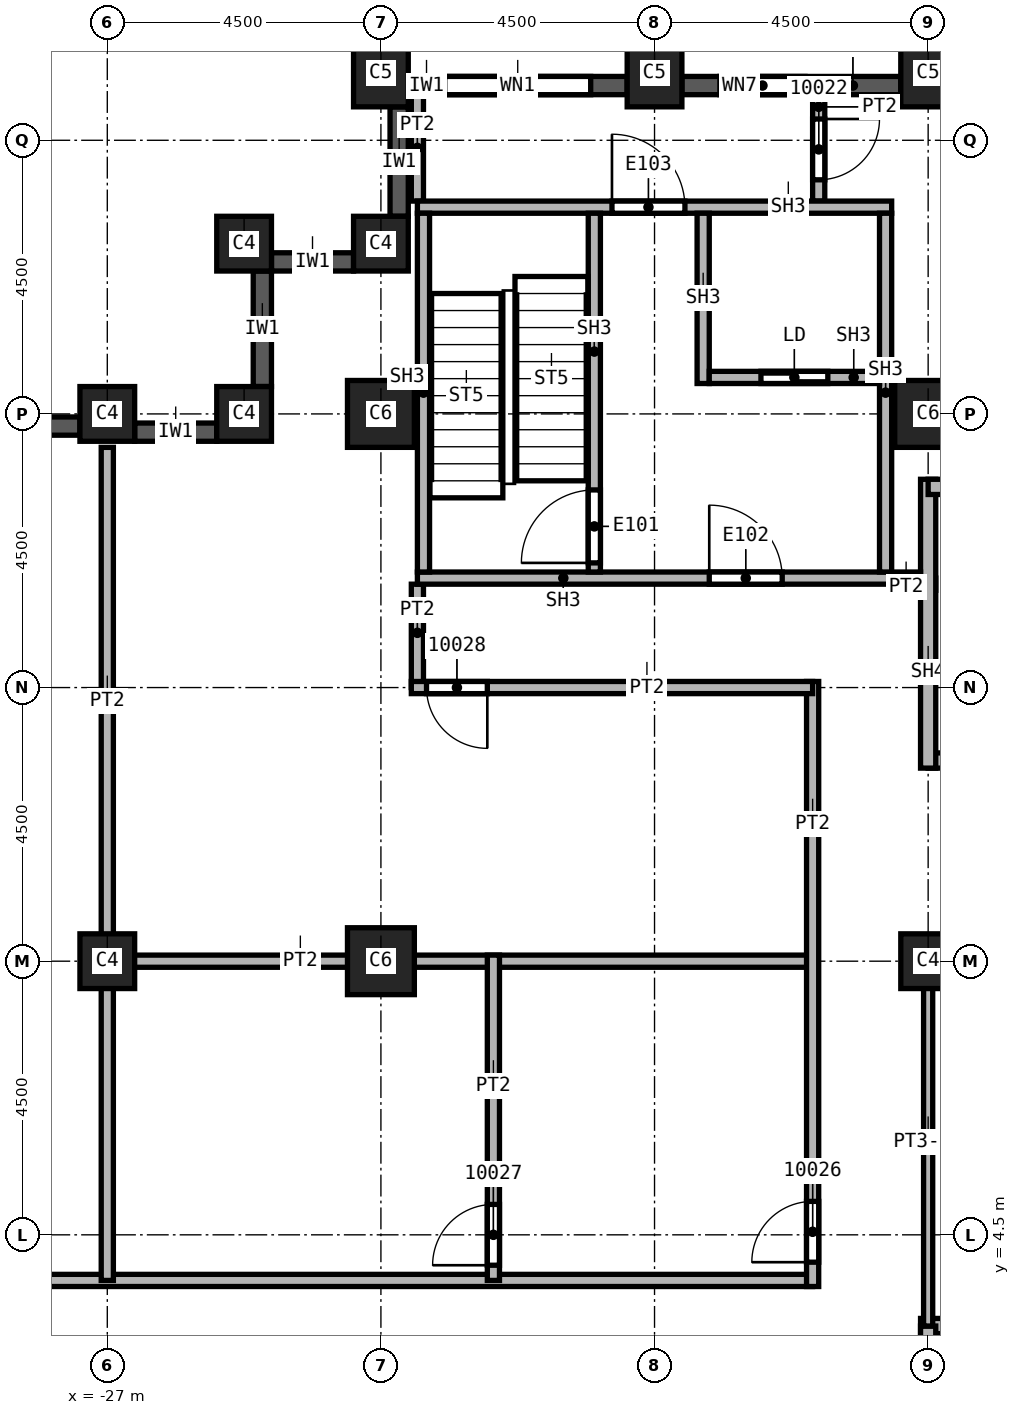
"""IFC4 building model, lengths in metres.
Left out: names, types, materials, properties, quantities, classifications, styles, units other than length and angle.
Written with IfcOpenShell. Run it as: python <this file> out.ifc"""

import sys

from ifc_helpers import new_model, si_unit, direction, frame, frame_2d, origin, origin_2d, place, context, subcontext, project, spatial, rectangle, extrude, element, fill, save


model = new_model("IFC4")
c1 = context("Model", 3, precision=1e-05, world=origin(), true_north=direction((0.0, 1.0)))
c2 = subcontext(c1, "Body", "Model", "MODEL_VIEW")
j1 = project(units=[si_unit("LENGTHUNIT", "METRE"), si_unit("PLANEANGLEUNIT", "RADIAN")], contexts=[c1])
p1 = place(None, origin())
s1 = spatial("IfcSite", under=j1, at=p1, CompositionType="ELEMENT")
p2 = place(p1, origin())
s2 = spatial("IfcBuilding", under=s1, at=p2, CompositionType="ELEMENT")
p3 = place(p2, frame((0.0, 0.0, 170.0)))
s3 = spatial("IfcBuildingStorey", under=s2, at=p3, CompositionType="ELEMENT", Elevation=170.0)
for number, where, z_axis, x_axis in (
    (1, (-13.5, 18.0, 0.0), (0.0, 0.0, 1.0), (1.0, 0.0, 0.0)),
    (2, (-22.5, 9.0, 0.0), (0.0, 0.0, 1.0), (1.0, 0.0, 0.0)),
    (3, (-22.5, 18.0, 0.0), (0.0, 0.0, 1.0), (1.0, 0.0, 0.0)),
):
    element("IfcColumn", number, at=place(p3, frame(where, z_axis=z_axis, x_axis=x_axis)), inside=s3, PredefinedType="COLUMN", context=c2, shape_type="SweptSolid", body=[
        extrude(rectangle(XDim=1.1, YDim=1.1, at=origin_2d()), origin(), (0.0, 0.0, 1.0), 3.7),
    ])
p4 = place(p3, frame((-13.5, 9.0, 0.0), z_axis=(0.0, 0.0, 1.0), x_axis=(1.0, 0.0, 0.0)))
e4 = element("IfcColumn", 4, at=p4, inside=s3, PredefinedType="COLUMN", context=c2, shape_type="SweptSolid", body=[
    extrude(rectangle(XDim=0.9, YDim=0.9, at=origin_2d()), origin(), (0.0, 0.0, 1.0), 3.7),
])
for number, where, z_axis, x_axis in (
    (5, (-13.5, 23.6, 0.0), (0.0, 0.0, 1.0), (1.0, 0.0, 0.0)),
    (6, (-18.0, 23.6, 0.0), (0.0, 0.0, 1.0), (1.0, 0.0, 0.0)),
    (7, (-22.5, 23.6, 0.0), (0.0, 0.0, 1.0), (1.0, 0.0, 0.0)),
):
    element("IfcColumn", number, at=place(p3, frame(where, z_axis=z_axis, x_axis=x_axis)), inside=s3, PredefinedType="COLUMN", context=c2, shape_type="SweptSolid", body=[
        extrude(rectangle(XDim=0.9, YDim=1.1, at=origin_2d()), origin(), (0.0, 0.0, 1.0), 3.7),
    ])
for number, where, z_axis, x_axis in (
    (8, (-27.0, 9.0, 0.0), (0.0, 0.0, 1.0), (1.0, 0.0, 0.0)),
    (9, (-27.0, 18.0, 0.0), (0.0, 0.0, 1.0), (1.0, 0.0, 0.0)),
    (10, (-22.5, 20.8, 0.0), (0.0, 0.0, 1.0), (1.0, 0.0, 0.0)),
    (11, (-24.75, 20.8, 0.0), (0.0, 0.0, 1.0), (1.0, 0.0, 0.0)),
    (12, (-24.75, 18.0, 0.0), (0.0, 0.0, 1.0), (1.0, 0.0, 0.0)),
):
    element("IfcColumn", number, at=place(p3, frame(where, z_axis=z_axis, x_axis=x_axis)), inside=s3, PredefinedType="COLUMN", context=c2, shape_type="SweptSolid", body=[
        extrude(rectangle(XDim=0.9, YDim=0.9, at=origin_2d()), origin(), (0.0, 0.0, 1.0), 3.7),
    ])
p5 = place(p3, frame((-22.2, 23.05, 0.0), z_axis=(0.0, 0.0, 1.0), x_axis=(0.0, -1.0, 0.0)))
e13 = element("IfcWall", 13, at=p5, inside=s3, PredefinedType="SOLIDWALL", context=c2, shape_type="SweptSolid", body=[
    extrude(rectangle(XDim=1.8, YDim=0.3, at=frame_2d((0.9, 0.0))), origin(), (0.0, 0.0, 1.0), 3.1),
])
p6 = place(p3, frame((-22.95, 20.5, 0.0), z_axis=(0.0, 0.0, 1.0), x_axis=(-1.0, 0.0, 0.0)))
e14 = element("IfcWall", 14, at=p6, inside=s3, PredefinedType="SOLIDWALL", context=c2, shape_type="SweptSolid", body=[
    extrude(rectangle(XDim=1.35, YDim=0.3, at=frame_2d((0.675, 0.0))), origin(), (0.0, 0.0, 1.0), 3.1),
])
p7 = place(p3, frame((-24.45, 20.35, 0.0), z_axis=(0.0, 0.0, 1.0), x_axis=(0.0, -1.0, 0.0)))
e15 = element("IfcWall", 15, at=p7, inside=s3, PredefinedType="SOLIDWALL", context=c2, shape_type="SweptSolid", body=[
    extrude(rectangle(XDim=1.9, YDim=0.3, at=frame_2d((0.95, 0.0))), origin(), (0.0, 0.0, 1.0), 3.1),
])
p8 = place(p3, frame((-25.2, 17.7, 0.0), z_axis=(0.0, 0.0, 1.0), x_axis=(-1.0, 0.0, 0.0)))
e16 = element("IfcWall", 16, at=p8, inside=s3, PredefinedType="SOLIDWALL", context=c2, shape_type="SweptSolid", body=[
    extrude(rectangle(XDim=1.35, YDim=0.3, at=frame_2d((0.675, 0.0))), origin(), (0.0, 0.0, 1.0), 3.1),
])
p9 = place(p3, frame((-27.45, 17.8, 0.0), z_axis=(0.0, 0.0, 1.0), x_axis=(-1.0, 0.0, 0.0)))
e17 = element("IfcWall", 17, at=p9, inside=s3, PredefinedType="SOLIDWALL", context=c2, shape_type="SweptSolid", body=[
    extrude(rectangle(XDim=3.6, YDim=0.3, at=frame_2d((1.8, 0.0))), origin(), (0.0, 0.0, 1.0), 3.1),
])
p10 = place(p9, frame((0.6, 0.0, 0.8)))
e18 = element("IfcOpeningElement", 18, at=p10, cuts=e17, PredefinedType="OPENING", context=c2, shape_type="SweptSolid", body=[
    extrude(rectangle(XDim=2.4, YDim=1.95, at=frame_2d((1.2, 0.975))), frame((0.0, 0.15, 0.0), z_axis=(0.0, -1.0, 0.0), x_axis=(1.0, 0.0, 0.0)), (0.0, 0.0, 1.0), 0.3),
])
p11 = place(p3, frame((-13.95, 23.4, 0.0), z_axis=(0.0, 0.0, 1.0), x_axis=(-1.0, 0.0, 0.0)))
e19 = element("IfcWall", 19, at=p11, inside=s3, PredefinedType="SOLIDWALL", context=c2, shape_type="SweptSolid", body=[
    extrude(rectangle(XDim=3.6, YDim=0.3, at=frame_2d((1.8, 0.0))), origin(), (0.0, 0.0, 1.0), 3.1),
])
p12 = place(p11, frame((1.575, 0.0, 0.8)))
e20 = element("IfcOpeningElement", 20, at=p12, cuts=e19, PredefinedType="OPENING", context=c2, shape_type="SweptSolid", body=[
    extrude(rectangle(XDim=1.4, YDim=1.95, at=frame_2d((0.7, 0.975))), frame((0.0, 0.15, 0.0), z_axis=(0.0, -1.0, 0.0), x_axis=(1.0, 0.0, 0.0)), (0.0, 0.0, 1.0), 0.3),
])
p13 = place(p3, frame((-18.45, 23.4, 0.0), z_axis=(0.0, 0.0, 1.0), x_axis=(-1.0, 0.0, 0.0)))
e21 = element("IfcWall", 21, at=p13, inside=s3, PredefinedType="SOLIDWALL", context=c2, shape_type="SweptSolid", body=[
    extrude(rectangle(XDim=3.6, YDim=0.3, at=frame_2d((1.8, 0.0))), origin(), (0.0, 0.0, 1.0), 3.1),
])
p14 = place(p13, frame((0.6, 0.0, 0.8)))
e22 = element("IfcOpeningElement", 22, at=p14, cuts=e21, PredefinedType="OPENING", context=c2, shape_type="SweptSolid", body=[
    extrude(rectangle(XDim=2.4, YDim=1.95, at=frame_2d((1.2, 0.975))), frame((0.0, 0.15, 0.0), z_axis=(0.0, -1.0, 0.0), x_axis=(1.0, 0.0, 0.0)), (0.0, 0.0, 1.0), 0.3),
])
p15 = place(p3, frame((-33.85, 3.75, 0.0), z_axis=(0.0, 0.0, 1.0), x_axis=(1.0, 0.0, 0.0)))
e23 = element("IfcWall", 23, at=p15, inside=s3, PredefinedType="PARTITIONING", context=c2, shape_type="SweptSolid", body=[
    extrude(rectangle(XDim=18.45, YDim=0.2, at=frame_2d((9.225, 0.0))), origin(), (0.0, 0.0, 1.0), 3.7),
])
p16 = place(p3, frame((-27.1, 9.0, 0.0), z_axis=(0.0, 0.0, 1.0), x_axis=(1.0, 0.0, 0.0)))
e24 = element("IfcWall", 24, at=p16, inside=s3, PredefinedType="PARTITIONING", context=c2, shape_type="SweptSolid", body=[
    extrude(rectangle(XDim=11.7, YDim=0.2, at=frame_2d((5.85, 0.0))), origin(), (0.0, 0.0, 1.0), 3.7),
])
p17 = place(p3, frame((-27.0, 3.75, 0.0), z_axis=(0.0, 0.0, 1.0), x_axis=(0.0, 1.0, 0.0)))
e25 = element("IfcWall", 25, at=p17, inside=s3, PredefinedType="PARTITIONING", context=c2, shape_type="SweptSolid", body=[
    extrude(rectangle(XDim=13.7, YDim=0.2, at=frame_2d((6.85, 0.0))), origin(), (0.0, 0.0, 1.0), 3.7),
])
p18 = place(p3, frame((-21.9, 13.5, 0.0), z_axis=(0.0, 0.0, 1.0), x_axis=(0.0, 1.0, 0.0)))
e26 = element("IfcWall", 26, at=p18, inside=s3, PredefinedType="PARTITIONING", context=c2, shape_type="SweptSolid", body=[
    extrude(rectangle(XDim=1.7, YDim=0.2, at=frame_2d((0.85, 0.0))), origin(), (0.0, 0.0, 1.0), 3.7),
])
p19 = place(p3, frame((-21.9, 21.5, 0.0), z_axis=(0.0, 0.0, 1.0), x_axis=(0.0, 1.0, 0.0)))
e27 = element("IfcWall", 27, at=p19, inside=s3, PredefinedType="PARTITIONING", context=c2, shape_type="SweptSolid", body=[
    extrude(rectangle(XDim=1.75, YDim=0.2, at=frame_2d((0.875, 0.0))), origin(), (0.0, 0.0, 1.0), 3.7),
])
p20 = place(p3, frame((-20.65, 3.75, 0.0), z_axis=(0.0, 0.0, 1.0), x_axis=(0.0, 1.0, 0.0)))
e28 = element("IfcWall", 28, at=p20, inside=s3, PredefinedType="PARTITIONING", context=c2, shape_type="SweptSolid", body=[
    extrude(rectangle(XDim=5.35, YDim=0.2, at=frame_2d((2.675, 0.0))), origin(), (0.0, 0.0, 1.0), 3.7),
])
p21 = place(p20, frame((0.25, 0.0, 0.0)))
e29 = element("IfcOpeningElement", 29, at=p21, cuts=e28, PredefinedType="OPENING", context=c2, shape_type="SweptSolid", body=[
    extrude(rectangle(XDim=1.0, YDim=2.1, at=frame_2d((0.5, 1.05))), frame((0.0, 0.1, 0.0), z_axis=(0.0, -1.0, 0.0), x_axis=(1.0, 0.0, 0.0)), (0.0, 0.0, 1.0), 0.2),
])
p22 = place(p3, frame((-15.4, 3.65, 0.0), z_axis=(0.0, 0.0, 1.0), x_axis=(0.0, 1.0, 0.0)))
e30 = element("IfcWall", 30, at=p22, inside=s3, PredefinedType="PARTITIONING", context=c2, shape_type="SweptSolid", body=[
    extrude(rectangle(XDim=9.95, YDim=0.2, at=frame_2d((4.975, 0.0))), origin(), (0.0, 0.0, 1.0), 3.7),
])
p23 = place(p22, frame((0.4, 0.0, 0.0)))
e31 = element("IfcOpeningElement", 31, at=p23, cuts=e30, PredefinedType="OPENING", context=c2, shape_type="SweptSolid", body=[
    extrude(rectangle(XDim=1.0, YDim=2.1, at=frame_2d((0.5, 1.05))), frame((0.0, 0.1, 0.0), z_axis=(0.0, -1.0, 0.0), x_axis=(1.0, 0.0, 0.0)), (0.0, 0.0, 1.0), 0.2),
])
p24 = place(p3, frame((-15.4, 13.5, 0.0), z_axis=(0.0, 0.0, 1.0), x_axis=(-1.0, 0.0, 0.0)))
e32 = element("IfcWall", 32, at=p24, inside=s3, PredefinedType="PARTITIONING", context=c2, shape_type="SweptSolid", body=[
    extrude(rectangle(XDim=6.6, YDim=0.2, at=frame_2d((3.3, 0.0))), origin(), (0.0, 0.0, 1.0), 3.7),
])
p25 = place(p24, frame((5.35, 0.0, 0.0)))
e33 = element("IfcOpeningElement", 33, at=p25, cuts=e32, PredefinedType="OPENING", context=c2, shape_type="SweptSolid", body=[
    extrude(rectangle(XDim=1.0, YDim=2.1, at=frame_2d((0.5, 1.05))), frame((0.0, 0.1, 0.0), z_axis=(0.0, -1.0, 0.0), x_axis=(1.0, 0.0, 0.0)), (0.0, 0.0, 1.0), 0.2),
])
p26 = place(p3, frame((-15.3, 23.25, 0.0), z_axis=(0.0, 0.0, 1.0), x_axis=(0.0, -1.0, 0.0)))
e34 = element("IfcWall", 34, at=p26, inside=s3, PredefinedType="PARTITIONING", context=c2, shape_type="SweptSolid", body=[
    extrude(rectangle(XDim=1.75, YDim=0.2, at=frame_2d((0.875, 0.0))), origin(), (0.0, 0.0, 1.0), 3.7),
])
p27 = place(p26, frame((0.4, 0.0, 0.0)))
e35 = element("IfcOpeningElement", 35, at=p27, cuts=e34, PredefinedType="OPENING", context=c2, shape_type="SweptSolid", body=[
    extrude(rectangle(XDim=1.0, YDim=2.1, at=frame_2d((0.5, 1.05))), frame((0.0, 0.1, 0.0), z_axis=(0.0, -1.0, 0.0), x_axis=(1.0, 0.0, 0.0)), (0.0, 0.0, 1.0), 0.2),
])
p28 = place(p3, frame((-14.1, 15.2, 0.0), z_axis=(0.0, 0.0, 1.0), x_axis=(1.0, 0.0, 0.0)))
e36 = element("IfcWall", 36, at=p28, inside=s3, PredefinedType="PARTITIONING", context=c2, shape_type="SweptSolid", body=[
    extrude(rectangle(XDim=0.725, YDim=0.2, at=frame_2d((0.363, 0.0))), origin(), (0.0, 0.0, 1.0), 3.7),
])
p29 = place(p3, frame((-13.625, 3.0, 0.0), z_axis=(0.0, 0.0, 1.0), x_axis=(1.0, 0.0, 0.0)))
e37 = element("IfcWall", 37, at=p29, inside=s3, PredefinedType="SOLIDWALL", context=c2, shape_type="SweptSolid", body=[
    extrude(rectangle(XDim=6.125, YDim=0.25, at=frame_2d((3.062, 0.0))), origin(), (0.0, 0.0, 1.0), 3.7),
])
p30 = place(p29, frame((3.25, 0.0, 0.0)))
e38 = element("IfcOpeningElement", 38, at=p30, cuts=e37, PredefinedType="OPENING", context=c2, shape_type="SweptSolid", body=[
    extrude(rectangle(XDim=1.1, YDim=2.1, at=frame_2d((0.55, 1.05))), frame((0.0, 0.125, 0.0), z_axis=(0.0, -1.0, 0.0), x_axis=(1.0, 0.0, 0.0)), (0.0, 0.0, 1.0), 0.25),
])
p31 = place(p3, frame((-13.5, -3.0, 0.0), z_axis=(0.0, 0.0, 1.0), x_axis=(0.0, 1.0, 0.0)))
e39 = element("IfcWall", 39, at=p31, inside=s3, PredefinedType="SOLIDWALL", context=c2, shape_type="SweptSolid", body=[
    extrude(rectangle(XDim=6.0, YDim=0.25, at=frame_2d((3.0, 0.0))), origin(), (0.0, 0.0, 1.0), 2.938),
])
p32 = place(p3, frame((-13.5, 12.3, 0.0), z_axis=(0.0, 0.0, 1.0), x_axis=(1.0, 0.0, 0.0)))
e40 = element("IfcWall", 40, at=p32, inside=s3, PredefinedType="SOLIDWALL", context=c2, shape_type="SweptSolid", body=[
    extrude(rectangle(XDim=9.125, YDim=0.25, at=frame_2d((4.562, 0.0))), origin(), (0.0, 0.0, 1.0), 3.7),
])
p33 = place(p32, frame((0.6, 0.0, 0.0)))
e41 = element("IfcOpeningElement", 41, at=p33, cuts=e40, PredefinedType="OPENING", context=c2, shape_type="SweptSolid", body=[
    extrude(rectangle(XDim=1.2, YDim=2.1, at=frame_2d((0.6, 1.05))), frame((0.0, 0.125, 0.0), z_axis=(0.0, -1.0, 0.0), x_axis=(1.0, 0.0, 0.0)), (0.0, 0.0, 1.0), 0.25),
])
p34 = place(p3, frame((-13.5, 12.175, 0.0), z_axis=(0.0, 0.0, 1.0), x_axis=(0.0, 1.0, 0.0)))
e42 = element("IfcWall", 42, at=p34, inside=s3, PredefinedType="SOLIDWALL", context=c2, shape_type="SweptSolid", body=[
    extrude(rectangle(XDim=4.75, YDim=0.25, at=frame_2d((2.375, 0.0))), origin(), (0.0, 0.0, 1.0), 3.7),
])
p35 = place(p3, frame((-13.5, 16.8, 0.0), z_axis=(0.0, 0.0, 1.0), x_axis=(1.0, 0.0, 0.0)))
e43 = element("IfcWall", 43, at=p35, inside=s3, PredefinedType="SOLIDWALL", context=c2, shape_type="SweptSolid", body=[
    extrude(rectangle(XDim=9.125, YDim=0.25, at=frame_2d((4.562, 0.0))), origin(), (0.0, 0.0, 1.0), 3.7),
])
p36 = place(p3, frame((-13.5, 3.0, 0.0), z_axis=(0.0, 0.0, 1.0), x_axis=(0.0, 1.0, 0.0)))
e44 = element("IfcWall", 44, at=p36, inside=s3, PredefinedType="PARTITIONING", context=c2, shape_type="SweptSolid", body=[
    extrude(rectangle(XDim=6.075, YDim=0.15, at=frame_2d((3.038, 0.0))), origin(), (0.0, 0.0, 1.0), 2.938),
])
p37 = place(p3, frame((-13.5, 9.0, 0.0), z_axis=(0.0, 0.0, 1.0), x_axis=(1.0, 0.0, 0.0)))
e45 = element("IfcWall", 45, at=p37, inside=s3, PredefinedType="PARTITIONING", context=c2, shape_type="SweptSolid", body=[
    extrude(rectangle(XDim=3.0, YDim=0.15, at=frame_2d((1.5, 0.0))), origin(), (0.0, 0.0, 1.0), 2.938),
])
p38 = place(p3, frame((-21.9, 15.3, 0.0), z_axis=(0.0, 0.0, 1.0), x_axis=(1.0, 0.0, 0.0)))
e46 = element("IfcWall", 46, at=p38, inside=s3, PredefinedType="SOLIDWALL", context=c2, shape_type="SweptSolid", body=[
    extrude(rectangle(XDim=8.275, YDim=0.2, at=frame_2d((4.137, 0.0))), origin(), (0.0, 0.0, 1.0), 3.7),
])
p39 = place(p38, frame((4.8, 0.0, 0.0)))
e47 = element("IfcOpeningElement", 47, at=p39, cuts=e46, PredefinedType="OPENING", context=c2, shape_type="SweptSolid", body=[
    extrude(rectangle(XDim=1.2, YDim=2.1, at=frame_2d((0.6, 1.05))), frame((0.0, 0.1, 0.0), z_axis=(0.0, -1.0, 0.0), x_axis=(1.0, 0.0, 0.0)), (0.0, 0.0, 1.0), 0.2),
])
p40 = place(p3, frame((-21.9, 21.4, 0.0), z_axis=(0.0, 0.0, 1.0), x_axis=(1.0, 0.0, 0.0)))
e48 = element("IfcWall", 48, at=p40, inside=s3, PredefinedType="SOLIDWALL", context=c2, shape_type="SweptSolid", body=[
    extrude(rectangle(XDim=7.8, YDim=0.2, at=frame_2d((3.9, 0.0))), origin(), (0.0, 0.0, 1.0), 3.7),
])
p41 = place(p40, frame((3.2, 0.0, 0.0)))
e49 = element("IfcOpeningElement", 49, at=p41, cuts=e48, PredefinedType="OPENING", context=c2, shape_type="SweptSolid", body=[
    extrude(rectangle(XDim=1.2, YDim=2.1, at=frame_2d((0.6, 1.05))), frame((0.0, 0.1, 0.0), z_axis=(0.0, -1.0, 0.0), x_axis=(1.0, 0.0, 0.0)), (0.0, 0.0, 1.0), 0.2),
])
for number, where, z_axis, x_axis in (
    (50, (-21.8, 15.4, 0.0), (0.0, 0.0, 1.0), (0.0, 1.0, 0.0)),
    (51, (-14.2, 15.4, 0.0), (0.0, 0.0, 1.0), (0.0, 1.0, 0.0)),
):
    element("IfcWall", number, at=place(p3, frame(where, z_axis=z_axis, x_axis=x_axis)), inside=s3, PredefinedType="SOLIDWALL", context=c2, shape_type="SweptSolid", body=[
        extrude(rectangle(XDim=5.9, YDim=0.2, at=frame_2d((2.95, 0.0))), origin(), (0.0, 0.0, 1.0), 3.7),
    ])
p42 = place(p3, frame((-18.99, 15.4, 0.0), z_axis=(0.0, 0.0, 1.0), x_axis=(0.0, 1.0, 0.0)))
e52 = element("IfcWall", 52, at=p42, inside=s3, PredefinedType="SOLIDWALL", context=c2, shape_type="SweptSolid", body=[
    extrude(rectangle(XDim=5.9, YDim=0.2, at=frame_2d((2.95, 0.0))), origin(), (0.0, 0.0, 1.0), 3.7),
])
p43 = place(p42, frame((0.15, 0.0, 0.0)))
e53 = element("IfcOpeningElement", 53, at=p43, cuts=e52, PredefinedType="OPENING", context=c2, shape_type="SweptSolid", body=[
    extrude(rectangle(XDim=1.2, YDim=2.1, at=frame_2d((0.6, 1.05))), frame((0.0, 0.1, 0.0), z_axis=(0.0, -1.0, 0.0), x_axis=(1.0, 0.0, 0.0)), (0.0, 0.0, 1.0), 0.2),
])
p44 = place(p3, frame((-17.2, 18.5, 0.0), z_axis=(0.0, 0.0, 1.0), x_axis=(0.0, 1.0, 0.0)))
e54 = element("IfcWall", 54, at=p44, inside=s3, PredefinedType="SOLIDWALL", context=c2, shape_type="SweptSolid", body=[
    extrude(rectangle(XDim=2.8, YDim=0.2, at=frame_2d((1.4, 0.0))), origin(), (0.0, 0.0, 1.0), 3.7),
])
p45 = place(p3, frame((-17.1, 18.6, 0.0), z_axis=(0.0, 0.0, 1.0), x_axis=(1.0, 0.0, 0.0)))
e55 = element("IfcWall", 55, at=p45, inside=s3, PredefinedType="SOLIDWALL", context=c2, shape_type="SweptSolid", body=[
    extrude(rectangle(XDim=2.8, YDim=0.2, at=frame_2d((1.4, 0.0))), origin(), (0.0, 0.0, 1.0), 3.7),
])
p46 = place(p45, frame((0.85, 0.0, 0.0)))
e56 = element("IfcOpeningElement", 56, at=p46, cuts=e55, PredefinedType="OPENING", context=c2, shape_type="SweptSolid", body=[
    extrude(rectangle(XDim=1.1, YDim=2.1, at=frame_2d((0.55, 1.05))), frame((0.0, 0.1, 0.0), z_axis=(0.0, -1.0, 0.0), x_axis=(1.0, 0.0, 0.0)), (0.0, 0.0, 1.0), 0.2),
])
p47 = place(p14, origin())
e57 = element("IfcWindow", 57, at=p47, inside=s3, PartitioningType="SINGLE_PANEL", PredefinedType="WINDOW", context=c2, shape_type="SweptSolid", body=[
    extrude(rectangle(XDim=2.4, YDim=1.95, at=frame_2d((1.2, 0.975))), frame((0.0, 0.03, 0.0), z_axis=(0.0, -1.0, 0.0), x_axis=(1.0, 0.0, 0.0)), (0.0, 0.0, 1.0), 0.06),
])
fill(e22, e57)
p48 = place(p27, origin())
e58 = element("IfcDoor", 58, at=p48, inside=s3, OperationType="SINGLE_SWING_LEFT", PredefinedType="DOOR", context=c2, shape_type="SweptSolid", body=[
    extrude(rectangle(XDim=1.0, YDim=2.1, at=frame_2d((0.5, 1.05))), frame((0.0, 0.025, 0.0), z_axis=(0.0, -1.0, 0.0), x_axis=(1.0, 0.0, 0.0)), (0.0, 0.0, 1.0), 0.05),
])
fill(e35, e58)
p49 = place(p23, origin())
e59 = element("IfcDoor", 59, at=p49, inside=s3, OperationType="SINGLE_SWING_LEFT", PredefinedType="DOOR", context=c2, shape_type="SweptSolid", body=[
    extrude(rectangle(XDim=1.0, YDim=2.1, at=frame_2d((0.5, 1.05))), frame((0.0, 0.025, 0.0), z_axis=(0.0, -1.0, 0.0), x_axis=(1.0, 0.0, 0.0)), (0.0, 0.0, 1.0), 0.05),
])
fill(e31, e59)
p50 = place(p21, origin())
e60 = element("IfcDoor", 60, at=p50, inside=s3, OperationType="SINGLE_SWING_RIGHT", PredefinedType="DOOR", context=c2, shape_type="SweptSolid", body=[
    extrude(rectangle(XDim=1.0, YDim=2.1, at=frame_2d((0.5, 1.05))), frame((0.0, 0.025, 0.0), z_axis=(0.0, -1.0, 0.0), x_axis=(1.0, 0.0, 0.0)), (0.0, 0.0, 1.0), 0.05),
])
fill(e29, e60)
p51 = place(p25, origin())
e61 = element("IfcDoor", 61, at=p51, inside=s3, OperationType="SINGLE_SWING_LEFT", PredefinedType="DOOR", context=c2, shape_type="SweptSolid", body=[
    extrude(rectangle(XDim=1.0, YDim=2.1, at=frame_2d((0.5, 1.05))), frame((0.0, 0.025, 0.0), z_axis=(0.0, -1.0, 0.0), x_axis=(1.0, 0.0, 0.0)), (0.0, 0.0, 1.0), 0.05),
])
fill(e33, e61)
p52 = place(p43, origin())
e62 = element("IfcDoor", 62, at=p52, inside=s3, OperationType="SINGLE_SWING_LEFT", PredefinedType="DOOR", context=c2, shape_type="SweptSolid", body=[
    extrude(rectangle(XDim=1.2, YDim=2.1, at=frame_2d((0.6, 1.05))), frame((0.0, 0.025, 0.0), z_axis=(0.0, -1.0, 0.0), x_axis=(1.0, 0.0, 0.0)), (0.0, 0.0, 1.0), 0.05),
])
fill(e53, e62)
p53 = place(p46, origin())
e63 = element("IfcDoor", 63, at=p53, inside=s3, OperationType="SLIDING_TO_LEFT", PredefinedType="DOOR", context=c2, shape_type="SweptSolid", body=[
    extrude(rectangle(XDim=1.1, YDim=2.1, at=frame_2d((0.55, 1.05))), frame((0.0, 0.025, 0.0), z_axis=(0.0, -1.0, 0.0), x_axis=(1.0, 0.0, 0.0)), (0.0, 0.0, 1.0), 0.05),
])
fill(e56, e63)
p54 = place(p39, origin())
e64 = element("IfcDoor", 64, at=p54, inside=s3, OperationType="SINGLE_SWING_RIGHT", PredefinedType="DOOR", context=c2, shape_type="SweptSolid", body=[
    extrude(rectangle(XDim=1.2, YDim=2.1, at=frame_2d((0.6, 1.05))), frame((0.0, 0.025, 0.0), z_axis=(0.0, -1.0, 0.0), x_axis=(1.0, 0.0, 0.0)), (0.0, 0.0, 1.0), 0.05),
])
fill(e47, e64)
p55 = place(p41, origin())
e65 = element("IfcDoor", 65, at=p55, inside=s3, OperationType="SINGLE_SWING_LEFT", PredefinedType="DOOR", context=c2, shape_type="SweptSolid", body=[
    extrude(rectangle(XDim=1.2, YDim=2.1, at=frame_2d((0.6, 1.05))), frame((0.0, 0.025, 0.0), z_axis=(0.0, -1.0, 0.0), x_axis=(1.0, 0.0, 0.0)), (0.0, 0.0, 1.0), 0.05),
])
fill(e49, e65)
p56 = place(p12, origin())
e66 = element("IfcWindow", 66, at=p56, inside=s3, PartitioningType="SINGLE_PANEL", PredefinedType="WINDOW", context=c2, shape_type="SweptSolid", body=[
    extrude(rectangle(XDim=1.4, YDim=1.95, at=frame_2d((0.7, 0.975))), frame((0.0, 0.03, 0.0), z_axis=(0.0, -1.0, 0.0), x_axis=(1.0, 0.0, 0.0)), (0.0, 0.0, 1.0), 0.06),
])
fill(e20, e66)
save(model, sys.argv[1])
